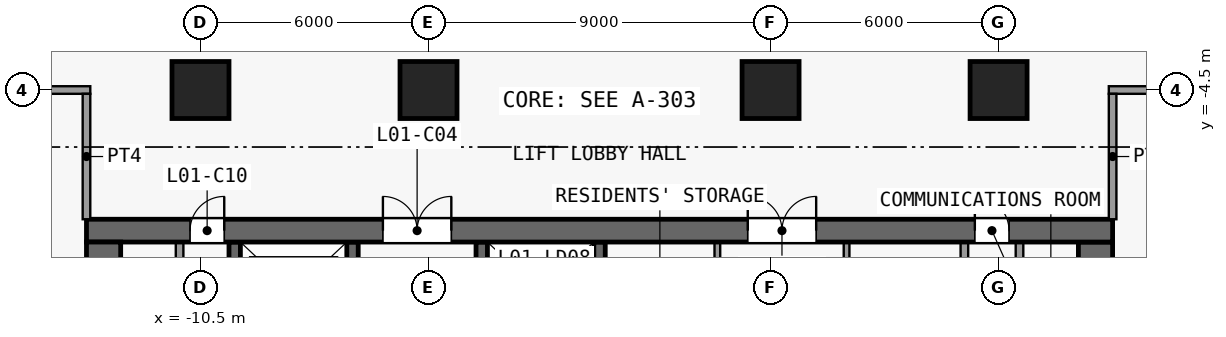
"""IFC4 building model, lengths in metres.
Left out: names, types, materials, properties, quantities, classifications, styles, units other than length and angle.
Written with IfcOpenShell. Run it as: python <this file> out.ifc"""

import sys

from ifc_helpers import new_model, si_unit, direction, frame, frame_2d, origin, origin_2d, place, context, subcontext, project, spatial, rectangle, extrude, element, fill, save


model = new_model("IFC4")
c1 = context("Model", 3, precision=1e-05, world=origin(), true_north=direction((0.0, 1.0)))
c2 = subcontext(c1, "Body", "Model", "MODEL_VIEW")
j1 = project(units=[si_unit("LENGTHUNIT", "METRE"), si_unit("PLANEANGLEUNIT", "RADIAN")], contexts=[c1])
p1 = place(None, origin())
s1 = spatial("IfcSite", under=j1, at=p1, CompositionType="ELEMENT")
p2 = place(p1, origin())
s2 = spatial("IfcBuilding", under=s1, at=p2, CompositionType="ELEMENT")
p3 = place(p2, frame((0.0, 0.0, 8.0)))
s3 = spatial("IfcBuildingStorey", under=s2, at=p3, CompositionType="ELEMENT", Elevation=8.0)
for number, where, z_axis, x_axis in (
    (1, (-10.5, -4.5, 0.0), (0.0, 0.0, 1.0), (1.0, 0.0, 0.0)),
    (2, (-4.5, -4.5, 0.0), (0.0, 0.0, 1.0), (1.0, 0.0, 0.0)),
    (3, (4.5, -4.5, 0.0), (0.0, 0.0, 1.0), (1.0, 0.0, 0.0)),
    (4, (10.5, -4.5, 0.0), (0.0, 0.0, 1.0), (1.0, 0.0, 0.0)),
):
    element("IfcColumn", number, at=place(p3, frame(where, z_axis=z_axis, x_axis=x_axis)), inside=s3, PredefinedType="COLUMN", context=c2, shape_type="SweptSolid", body=[
        extrude(rectangle(XDim=1.5, YDim=1.5, at=origin_2d()), origin(), (0.0, 0.0, 1.0), 5.5),
    ])
p4 = place(p3, frame((-13.5, -8.2, 0.0), z_axis=(0.0, 0.0, 1.0), x_axis=(1.0, 0.0, 0.0)))
e5 = element("IfcWall", 5, at=p4, inside=s3, PredefinedType="SHEAR", context=c2, shape_type="SweptSolid", body=[
    extrude(rectangle(XDim=27.0, YDim=0.6, at=frame_2d((13.5, 0.0))), origin(), (0.0, 0.0, 1.0), 5.15),
])
p5 = place(p4, frame((7.8, 0.0, 0.0)))
e6 = element("IfcOpeningElement", 6, at=p5, cuts=e5, PredefinedType="OPENING", context=c2, shape_type="SweptSolid", body=[
    extrude(rectangle(XDim=1.8, YDim=2.1, at=frame_2d((0.9, 1.05))), frame((0.0, 0.31, 0.0), z_axis=(0.0, -1.0, 0.0), x_axis=(1.0, 0.0, 0.0)), (0.0, 0.0, 1.0), 0.62),
])
p6 = place(p4, frame((17.4, 0.0, 0.0)))
e7 = element("IfcOpeningElement", 7, at=p6, cuts=e5, PredefinedType="OPENING", context=c2, shape_type="SweptSolid", body=[
    extrude(rectangle(XDim=1.8, YDim=2.1, at=frame_2d((0.9, 1.05))), frame((0.0, 0.31, 0.0), z_axis=(0.0, -1.0, 0.0), x_axis=(1.0, 0.0, 0.0)), (0.0, 0.0, 1.0), 0.62),
])
p7 = place(p4, frame((2.725, 0.0, 0.0)))
e8 = element("IfcOpeningElement", 8, at=p7, cuts=e5, PredefinedType="OPENING", context=c2, shape_type="SweptSolid", body=[
    extrude(rectangle(XDim=0.9, YDim=2.1, at=frame_2d((0.45, 1.05))), frame((0.0, 0.31, 0.0), z_axis=(0.0, -1.0, 0.0), x_axis=(1.0, 0.0, 0.0)), (0.0, 0.0, 1.0), 0.62),
])
p8 = place(p4, frame((23.375, 0.0, 0.0)))
e9 = element("IfcOpeningElement", 9, at=p8, cuts=e5, PredefinedType="OPENING", context=c2, shape_type="SweptSolid", body=[
    extrude(rectangle(XDim=0.9, YDim=2.1, at=frame_2d((0.45, 1.05))), frame((0.0, 0.31, 0.0), z_axis=(0.0, -1.0, 0.0), x_axis=(1.0, 0.0, 0.0)), (0.0, 0.0, 1.0), 0.62),
])
p9 = place(p3, frame((-13.05, -8.5, 0.0), z_axis=(0.0, 0.0, 1.0), x_axis=(0.0, -1.0, 0.0)))
e10 = element("IfcWall", 10, at=p9, inside=s3, PredefinedType="SHEAR", context=c2, shape_type="SweptSolid", body=[
    extrude(rectangle(XDim=16.1, YDim=0.9, at=frame_2d((8.05, 0.0))), origin(), (0.0, 0.0, 1.0), 5.15),
])
p10 = place(p9, frame((14.8, 0.0, 0.0)))
e11 = element("IfcOpeningElement", 11, at=p10, cuts=e10, PredefinedType="OPENING", context=c2, shape_type="SweptSolid", body=[
    extrude(rectangle(XDim=1.1, YDim=2.1, at=frame_2d((0.55, 1.05))), frame((0.0, 0.46, 0.0), z_axis=(0.0, -1.0, 0.0), x_axis=(1.0, 0.0, 0.0)), (0.0, 0.0, 1.0), 0.92),
])
p11 = place(p3, frame((13.05, -24.6, 0.0), z_axis=(0.0, 0.0, 1.0), x_axis=(0.0, 1.0, 0.0)))
e12 = element("IfcWall", 12, at=p11, inside=s3, PredefinedType="SHEAR", context=c2, shape_type="SweptSolid", body=[
    extrude(rectangle(XDim=16.1, YDim=0.9, at=frame_2d((8.05, 0.0))), origin(), (0.0, 0.0, 1.0), 5.15),
])
p12 = place(p11, frame((0.2, 0.0, 0.0)))
e13 = element("IfcOpeningElement", 13, at=p12, cuts=e12, PredefinedType="OPENING", context=c2, shape_type="SweptSolid", body=[
    extrude(rectangle(XDim=1.1, YDim=2.1, at=frame_2d((0.55, 1.05))), frame((0.0, 0.46, 0.0), z_axis=(0.0, -1.0, 0.0), x_axis=(1.0, 0.0, 0.0)), (0.0, 0.0, 1.0), 0.92),
])
p13 = place(p3, frame((-11.05, -14.7, 0.0), z_axis=(0.0, 0.0, 1.0), x_axis=(0.0, 1.0, 0.0)))
e14 = element("IfcWall", 14, at=p13, inside=s3, PredefinedType="PARTITIONING", context=c2, shape_type="SweptSolid", body=[
    extrude(rectangle(XDim=6.2, YDim=0.2, at=frame_2d((3.1, 0.0))), origin(), (0.0, 0.0, 1.0), 5.15),
])
p14 = place(p13, frame((2.7, 0.0, 0.0)))
e15 = element("IfcOpeningElement", 15, at=p14, cuts=e14, PredefinedType="OPENING", context=c2, shape_type="SweptSolid", body=[
    extrude(rectangle(XDim=0.9, YDim=2.1, at=frame_2d((0.45, 1.05))), frame((0.0, 0.11, 0.0), z_axis=(0.0, -1.0, 0.0), x_axis=(1.0, 0.0, 0.0)), (0.0, 0.0, 1.0), 0.22),
])
p15 = place(p3, frame((-9.6, -17.2, 0.0), z_axis=(0.0, 0.0, 1.0), x_axis=(0.0, 1.0, 0.0)))
e16 = element("IfcWall", 16, at=p15, inside=s3, PredefinedType="SHEAR", context=c2, shape_type="SweptSolid", body=[
    extrude(rectangle(XDim=8.7, YDim=0.3, at=frame_2d((4.35, 0.0))), origin(), (0.0, 0.0, 1.0), 5.15),
])
p16 = place(p3, frame((-6.5, -22.5, 0.0), z_axis=(0.0, 0.0, 1.0), x_axis=(0.0, 1.0, 0.0)))
e17 = element("IfcWall", 17, at=p16, inside=s3, PredefinedType="SHEAR", context=c2, shape_type="SweptSolid", body=[
    extrude(rectangle(XDim=14.0, YDim=0.3, at=frame_2d((7.0, 0.0))), origin(), (0.0, 0.0, 1.0), 5.15),
])
p17 = place(p16, frame((0.94, 0.0, 0.0)))
e18 = element("IfcOpeningElement", 18, at=p17, cuts=e17, PredefinedType="OPENING", context=c2, shape_type="SweptSolid", body=[
    extrude(rectangle(XDim=1.1, YDim=2.1, at=frame_2d((0.55, 1.05))), frame((0.0, 0.16, 0.0), z_axis=(0.0, -1.0, 0.0), x_axis=(1.0, 0.0, 0.0)), (0.0, 0.0, 1.0), 0.32),
])
p18 = place(p16, frame((3.72, 0.0, 0.0)))
e19 = element("IfcOpeningElement", 19, at=p18, cuts=e17, PredefinedType="OPENING", context=c2, shape_type="SweptSolid", body=[
    extrude(rectangle(XDim=1.1, YDim=2.1, at=frame_2d((0.55, 1.05))), frame((0.0, 0.16, 0.0), z_axis=(0.0, -1.0, 0.0), x_axis=(1.0, 0.0, 0.0)), (0.0, 0.0, 1.0), 0.32),
])
p19 = place(p16, frame((6.5, 0.0, 0.0)))
e20 = element("IfcOpeningElement", 20, at=p19, cuts=e17, PredefinedType="OPENING", context=c2, shape_type="SweptSolid", body=[
    extrude(rectangle(XDim=1.1, YDim=2.1, at=frame_2d((0.55, 1.05))), frame((0.0, 0.16, 0.0), z_axis=(0.0, -1.0, 0.0), x_axis=(1.0, 0.0, 0.0)), (0.0, 0.0, 1.0), 0.32),
])
p20 = place(p16, frame((9.28, 0.0, 0.0)))
e21 = element("IfcOpeningElement", 21, at=p20, cuts=e17, PredefinedType="OPENING", context=c2, shape_type="SweptSolid", body=[
    extrude(rectangle(XDim=1.1, YDim=2.1, at=frame_2d((0.55, 1.05))), frame((0.0, 0.16, 0.0), z_axis=(0.0, -1.0, 0.0), x_axis=(1.0, 0.0, 0.0)), (0.0, 0.0, 1.0), 0.32),
])
p21 = place(p16, frame((12.06, 0.0, 0.0)))
e22 = element("IfcOpeningElement", 22, at=p21, cuts=e17, PredefinedType="OPENING", context=c2, shape_type="SweptSolid", body=[
    extrude(rectangle(XDim=1.1, YDim=2.1, at=frame_2d((0.55, 1.05))), frame((0.0, 0.16, 0.0), z_axis=(0.0, -1.0, 0.0), x_axis=(1.0, 0.0, 0.0)), (0.0, 0.0, 1.0), 0.32),
])
p22 = place(p3, frame((-3.1, -22.55, 0.0), z_axis=(0.0, 0.0, 1.0), x_axis=(0.0, 1.0, 0.0)))
e23 = element("IfcWall", 23, at=p22, inside=s3, PredefinedType="SHEAR", context=c2, shape_type="SweptSolid", body=[
    extrude(rectangle(XDim=14.05, YDim=0.3, at=frame_2d((7.025, 0.0))), origin(), (0.0, 0.0, 1.0), 5.15),
])
p23 = place(p22, frame((12.11, 0.0, 0.0)))
e24 = element("IfcOpeningElement", 24, at=p23, cuts=e23, PredefinedType="OPENING", context=c2, shape_type="SweptSolid", body=[
    extrude(rectangle(XDim=1.1, YDim=2.1, at=frame_2d((0.55, 1.05))), frame((0.0, 0.16, 0.0), z_axis=(0.0, -1.0, 0.0), x_axis=(1.0, 0.0, 0.0)), (0.0, 0.0, 1.0), 0.32),
])
p24 = place(p22, frame((0.84, 0.0, 0.0)))
e25 = element("IfcOpeningElement", 25, at=p24, cuts=e23, PredefinedType="OPENING", context=c2, shape_type="SweptSolid", body=[
    extrude(rectangle(XDim=1.4, YDim=2.1, at=frame_2d((0.7, 1.05))), frame((0.0, 0.16, 0.0), z_axis=(0.0, -1.0, 0.0), x_axis=(1.0, 0.0, 0.0)), (0.0, 0.0, 1.0), 0.32),
])
p25 = place(p3, frame((0.0, -22.25, 0.0), z_axis=(0.0, 0.0, 1.0), x_axis=(0.0, 1.0, 0.0)))
e26 = element("IfcWall", 26, at=p25, inside=s3, PredefinedType="SHEAR", context=c2, shape_type="SweptSolid", body=[
    extrude(rectangle(XDim=13.75, YDim=0.3, at=frame_2d((6.875, 0.0))), origin(), (0.0, 0.0, 1.0), 5.15),
])
p26 = place(p3, frame((3.1, -11.15, 0.0), z_axis=(0.0, 0.0, 1.0), x_axis=(0.0, 1.0, 0.0)))
e27 = element("IfcWall", 27, at=p26, inside=s3, PredefinedType="PARTITIONING", context=c2, shape_type="SweptSolid", body=[
    extrude(rectangle(XDim=2.65, YDim=0.15, at=frame_2d((1.325, 0.0))), origin(), (0.0, 0.0, 1.0), 5.15),
])
p27 = place(p26, frame((0.825, 0.0, 0.0)))
e28 = element("IfcOpeningElement", 28, at=p27, cuts=e27, PredefinedType="OPENING", context=c2, shape_type="SweptSolid", body=[
    extrude(rectangle(XDim=0.9, YDim=2.1, at=frame_2d((0.45, 1.05))), frame((0.0, 0.085, 0.0), z_axis=(0.0, -1.0, 0.0), x_axis=(1.0, 0.0, 0.0)), (0.0, 0.0, 1.0), 0.17),
])
p28 = place(p3, frame((6.5, -8.5, 0.0), z_axis=(0.0, 0.0, 1.0), x_axis=(0.0, -1.0, 0.0)))
e29 = element("IfcWall", 29, at=p28, inside=s3, PredefinedType="PARTITIONING", context=c2, shape_type="SweptSolid", body=[
    extrude(rectangle(XDim=10.85, YDim=0.15, at=frame_2d((5.425, 0.0))), origin(), (0.0, 0.0, 1.0), 5.15),
])
p29 = place(p28, frame((9.175, 0.0, 0.0)))
e30 = element("IfcOpeningElement", 30, at=p29, cuts=e29, PredefinedType="OPENING", context=c2, shape_type="SweptSolid", body=[
    extrude(rectangle(XDim=0.9, YDim=2.1, at=frame_2d((0.45, 1.05))), frame((0.0, 0.085, 0.0), z_axis=(0.0, -1.0, 0.0), x_axis=(1.0, 0.0, 0.0)), (0.0, 0.0, 1.0), 0.17),
])
p30 = place(p28, frame((3.525, 0.0, 0.0)))
e31 = element("IfcOpeningElement", 31, at=p30, cuts=e29, PredefinedType="OPENING", context=c2, shape_type="SweptSolid", body=[
    extrude(rectangle(XDim=1.2, YDim=2.1, at=frame_2d((0.6, 1.05))), frame((0.0, 0.085, 0.0), z_axis=(0.0, -1.0, 0.0), x_axis=(1.0, 0.0, 0.0)), (0.0, 0.0, 1.0), 0.17),
])
p31 = place(p3, frame((9.6, -16.9, 0.0), z_axis=(0.0, 0.0, 1.0), x_axis=(0.0, 1.0, 0.0)))
e32 = element("IfcWall", 32, at=p31, inside=s3, PredefinedType="PARTITIONING", context=c2, shape_type="SweptSolid", body=[
    extrude(rectangle(XDim=8.4, YDim=0.2, at=frame_2d((4.2, 0.0))), origin(), (0.0, 0.0, 1.0), 5.15),
])
p32 = place(p3, frame((11.05, -8.5, 0.0), z_axis=(0.0, 0.0, 1.0), x_axis=(0.0, -1.0, 0.0)))
e33 = element("IfcWall", 33, at=p32, inside=s3, PredefinedType="PARTITIONING", context=c2, shape_type="SweptSolid", body=[
    extrude(rectangle(XDim=3.6, YDim=0.2, at=frame_2d((1.8, 0.0))), origin(), (0.0, 0.0, 1.0), 5.15),
])
p33 = place(p32, frame((1.3, 0.0, 0.0)))
e34 = element("IfcOpeningElement", 34, at=p33, cuts=e33, PredefinedType="OPENING", context=c2, shape_type="SweptSolid", body=[
    extrude(rectangle(XDim=0.9, YDim=2.1, at=frame_2d((0.45, 1.05))), frame((0.0, 0.11, 0.0), z_axis=(0.0, -1.0, 0.0), x_axis=(1.0, 0.0, 0.0)), (0.0, 0.0, 1.0), 0.22),
])
p34 = place(p3, frame((-31.6, -4.5, 0.0), z_axis=(0.0, 0.0, 1.0), x_axis=(1.0, 0.0, 0.0)))
e35 = element("IfcWall", 35, at=p34, inside=s3, PredefinedType="PARTITIONING", context=c2, shape_type="SweptSolid", body=[
    extrude(rectangle(XDim=18.2, YDim=0.2, at=frame_2d((9.1, 0.0))), origin(), (0.0, 0.0, 1.0), 5.15),
])
p35 = place(p34, frame((3.2, 0.0, 0.0)))
e36 = element("IfcOpeningElement", 36, at=p35, cuts=e35, PredefinedType="OPENING", context=c2, shape_type="SweptSolid", body=[
    extrude(rectangle(XDim=1.0, YDim=2.1, at=frame_2d((0.5, 1.05))), frame((0.0, 0.11, 0.0), z_axis=(0.0, -1.0, 0.0), x_axis=(1.0, 0.0, 0.0)), (0.0, 0.0, 1.0), 0.22),
])
p36 = place(p34, frame((13.2, 0.0, 0.0)))
e37 = element("IfcOpeningElement", 37, at=p36, cuts=e35, PredefinedType="OPENING", context=c2, shape_type="SweptSolid", body=[
    extrude(rectangle(XDim=1.0, YDim=2.1, at=frame_2d((0.5, 1.05))), frame((0.0, 0.11, 0.0), z_axis=(0.0, -1.0, 0.0), x_axis=(1.0, 0.0, 0.0)), (0.0, 0.0, 1.0), 0.22),
])
p37 = place(p3, frame((13.4, -4.5, 0.0), z_axis=(0.0, 0.0, 1.0), x_axis=(1.0, 0.0, 0.0)))
e38 = element("IfcWall", 38, at=p37, inside=s3, PredefinedType="PARTITIONING", context=c2, shape_type="SweptSolid", body=[
    extrude(rectangle(XDim=15.2, YDim=0.2, at=frame_2d((7.6, 0.0))), origin(), (0.0, 0.0, 1.0), 5.15),
])
p38 = place(p37, frame((6.4, 0.0, 0.0)))
e39 = element("IfcOpeningElement", 39, at=p38, cuts=e38, PredefinedType="OPENING", context=c2, shape_type="SweptSolid", body=[
    extrude(rectangle(XDim=1.8, YDim=2.1, at=frame_2d((0.9, 1.05))), frame((0.0, 0.11, 0.0), z_axis=(0.0, -1.0, 0.0), x_axis=(1.0, 0.0, 0.0)), (0.0, 0.0, 1.0), 0.22),
])
for number, where, z_axis, x_axis in (
    (40, (-13.5, -7.9, 0.0), (0.0, 0.0, 1.0), (0.0, 1.0, 0.0)),
    (41, (13.5, -7.9, 0.0), (0.0, 0.0, 1.0), (0.0, 1.0, 0.0)),
):
    element("IfcWall", number, at=place(p3, frame(where, z_axis=z_axis, x_axis=x_axis)), inside=s3, PredefinedType="PARTITIONING", context=c2, shape_type="SweptSolid", body=[
        extrude(rectangle(XDim=3.3, YDim=0.2, at=frame_2d((1.65, 0.0))), origin(), (0.0, 0.0, 1.0), 5.15),
    ])
p39 = place(p5, origin())
e42 = element("IfcDoor", 42, at=p39, inside=s3, OperationType="DOUBLE_DOOR_SINGLE_SWING", PredefinedType="DOOR", context=c2, shape_type="SweptSolid", body=[
    extrude(rectangle(XDim=1.8, YDim=2.1, at=frame_2d((0.9, 1.05))), frame((0.0, 0.025, 0.0), z_axis=(0.0, -1.0, 0.0), x_axis=(1.0, 0.0, 0.0)), (0.0, 0.0, 1.0), 0.05),
])
fill(e6, e42)
p40 = place(p6, origin())
e43 = element("IfcDoor", 43, at=p40, inside=s3, OperationType="DOUBLE_DOOR_SINGLE_SWING", PredefinedType="DOOR", context=c2, shape_type="SweptSolid", body=[
    extrude(rectangle(XDim=1.8, YDim=2.1, at=frame_2d((0.9, 1.05))), frame((0.0, 0.025, 0.0), z_axis=(0.0, -1.0, 0.0), x_axis=(1.0, 0.0, 0.0)), (0.0, 0.0, 1.0), 0.05),
])
fill(e7, e43)
p41 = place(p7, origin())
e44 = element("IfcDoor", 44, at=p41, inside=s3, OperationType="SINGLE_SWING_RIGHT", PredefinedType="DOOR", context=c2, shape_type="SweptSolid", body=[
    extrude(rectangle(XDim=0.9, YDim=2.1, at=frame_2d((0.45, 1.05))), frame((0.0, 0.025, 0.0), z_axis=(0.0, -1.0, 0.0), x_axis=(1.0, 0.0, 0.0)), (0.0, 0.0, 1.0), 0.05),
])
fill(e8, e44)
p42 = place(p8, origin())
e45 = element("IfcDoor", 45, at=p42, inside=s3, OperationType="SINGLE_SWING_LEFT", PredefinedType="DOOR", context=c2, shape_type="SweptSolid", body=[
    extrude(rectangle(XDim=0.9, YDim=2.1, at=frame_2d((0.45, 1.05))), frame((0.0, 0.025, 0.0), z_axis=(0.0, -1.0, 0.0), x_axis=(1.0, 0.0, 0.0)), (0.0, 0.0, 1.0), 0.05),
])
fill(e9, e45)
save(model, sys.argv[1])
